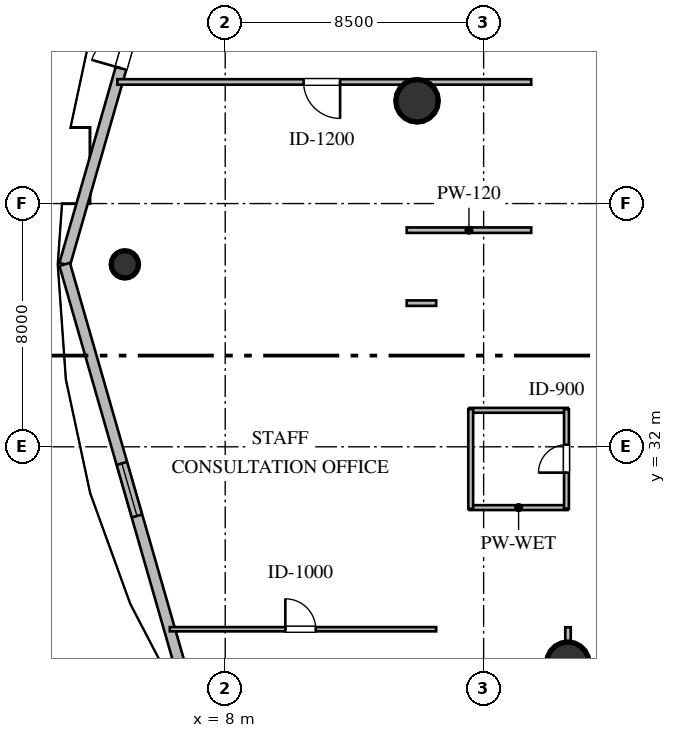
"""IFC4 building model, lengths in metres.
Left out: names, types, materials, properties, quantities, classifications, styles, units other than length and angle.
Written with IfcOpenShell. Run it as: python <this file> out.ifc"""

import sys

from ifc_helpers import new_model, si_unit, direction, frame, frame_2d, origin, origin_2d, place, context, subcontext, project, spatial, rectangle, circle, extrude, element, fill, save


model = new_model("IFC4")
c1 = context("Model", 3, precision=1e-05, world=origin(), true_north=direction((0.0, 1.0)))
c2 = subcontext(c1, "Body", "Model", "MODEL_VIEW")
j1 = project(units=[si_unit("LENGTHUNIT", "METRE"), si_unit("PLANEANGLEUNIT", "RADIAN")], contexts=[c1])
p1 = place(None, origin())
s1 = spatial("IfcSite", under=j1, at=p1, CompositionType="ELEMENT")
p2 = place(p1, origin())
s2 = spatial("IfcBuilding", under=s1, at=p2, CompositionType="ELEMENT")
p3 = place(p2, origin())
s3 = spatial("IfcBuildingStorey", under=s2, at=p3, CompositionType="ELEMENT", Elevation=0.0)
for number, where, z_axis, x_axis in (
    (1, (14.31, 43.38, 0.0), (0.0, 0.0, 1.0), (1.0, 0.0, 0.0)),
    (2, (19.27, 24.88, 0.0), (0.0, 0.0, 1.0), (1.0, 0.0, 0.0)),
):
    element("IfcColumn", number, at=place(p3, frame(where, z_axis=z_axis, x_axis=x_axis)), inside=s3, PredefinedType="COLUMN", context=c2, shape_type="SweptSolid", body=[
        extrude(circle(Radius=0.7, at=origin_2d()), origin(), (0.0, 0.0, 1.0), 4.8),
    ])
p4 = place(p3, frame((4.7, 38.0, 0.0), z_axis=(0.0, 0.0, 1.0), x_axis=(1.0, 0.0, 0.0)))
e3 = element("IfcColumn", 3, at=p4, inside=s3, PredefinedType="COLUMN", context=c2, shape_type="SweptSolid", body=[
    extrude(circle(Radius=0.45, at=origin_2d()), origin(), (0.0, 0.0, 1.0), 4.8),
])
p5 = place(p3, frame((2.72, 38.0, 0.0), z_axis=(0.0, 0.0, 1.0), x_axis=(0.276203409751, 0.961099202186, 0.0)))
e4 = element("IfcWall", 4, at=p5, inside=s3, PredefinedType="STANDARD", context=c2, shape_type="SweptSolid", body=[
    extrude(rectangle(XDim=15.42, YDim=0.36, at=frame_2d((7.71, 0.0))), origin(), (0.0, 0.0, 1.0), 4.52),
])
p6 = place(p5, frame((6.71, 0.0, 0.0)))
e5 = element("IfcOpeningElement", 5, at=p6, cuts=e4, PredefinedType="OPENING", context=c2, shape_type="SweptSolid", body=[
    extrude(rectangle(XDim=2.0, YDim=2.2, at=frame_2d((1.0, 1.1))), frame((0.0, 0.19, 0.0), z_axis=(0.0, -1.0, 0.0), x_axis=(1.0, 0.0, 0.0)), (0.0, 0.0, 1.0), 0.38),
])
p7 = place(p3, frame((2.72, 38.0, 0.0), z_axis=(0.0, 0.0, 1.0), x_axis=(0.276203409751, -0.961099202186, 0.0)))
e6 = element("IfcWall", 6, at=p7, inside=s3, PredefinedType="STANDARD", context=c2, shape_type="SweptSolid", body=[
    extrude(rectangle(XDim=15.42, YDim=0.36, at=frame_2d((7.71, 0.0))), origin(), (0.0, 0.0, 1.0), 4.52),
])
p8 = place(p7, frame((6.81, 0.0, 1.05)))
e7 = element("IfcOpeningElement", 7, at=p8, cuts=e6, PredefinedType="OPENING", context=c2, shape_type="SweptSolid", body=[
    extrude(rectangle(XDim=1.8, YDim=1.7, at=frame_2d((0.9, 0.85))), frame((0.0, 0.19, 0.0), z_axis=(0.0, -1.0, 0.0), x_axis=(1.0, 0.0, 0.0)), (0.0, 0.0, 1.0), 0.38),
])
for number, where, z_axis, x_axis in (
    (8, (16.035, 30.0, 0.0), (0.0, 0.0, 1.0), (1.0, 0.0, 0.0)),
    (9, (16.035, 33.2, 0.0), (0.0, 0.0, 1.0), (1.0, 0.0, 0.0)),
):
    element("IfcWall", number, at=place(p3, frame(where, z_axis=z_axis, x_axis=x_axis)), inside=s3, PredefinedType="PLUMBINGWALL", context=c2, shape_type="SweptSolid", body=[
        extrude(rectangle(XDim=3.23, YDim=0.16, at=frame_2d((1.615, 0.0))), origin(), (0.0, 0.0, 1.0), 4.52),
    ])
p9 = place(p3, frame((16.075, 29.96, 0.0), z_axis=(0.0, 0.0, 1.0), x_axis=(0.0, 1.0, 0.0)))
e10 = element("IfcWall", 10, at=p9, inside=s3, PredefinedType="PLUMBINGWALL", context=c2, shape_type="SweptSolid", body=[
    extrude(rectangle(XDim=3.28, YDim=0.16, at=frame_2d((1.64, 0.0))), origin(), (0.0, 0.0, 1.0), 4.52),
])
p10 = place(p3, frame((19.225, 29.96, 0.0), z_axis=(0.0, 0.0, 1.0), x_axis=(0.0, 1.0, 0.0)))
e11 = element("IfcWall", 11, at=p10, inside=s3, PredefinedType="PLUMBINGWALL", context=c2, shape_type="SweptSolid", body=[
    extrude(rectangle(XDim=3.28, YDim=0.16, at=frame_2d((1.64, 0.0))), origin(), (0.0, 0.0, 1.0), 4.52),
])
p11 = place(p10, frame((1.19, 0.0, 0.0)))
e12 = element("IfcOpeningElement", 12, at=p11, cuts=e11, PredefinedType="OPENING", context=c2, shape_type="SweptSolid", body=[
    extrude(rectangle(XDim=0.92, YDim=2.1, at=frame_2d((0.46, 1.05))), frame((0.0, 0.09, 0.0), z_axis=(0.0, -1.0, 0.0), x_axis=(1.0, 0.0, 0.0)), (0.0, 0.0, 1.0), 0.18),
])
p12 = place(p3, frame((18.065, 44.0, 0.0), z_axis=(0.0, 0.0, 1.0), x_axis=(-1.0, 0.0, 0.0)))
e13 = element("IfcWall", 13, at=p12, inside=s3, PredefinedType="PARTITIONING", context=c2, shape_type="SweptSolid", body=[
    extrude(rectangle(XDim=13.611, YDim=0.18, at=frame_2d((6.805, 0.0))), origin(), (0.0, 0.0, 1.0), 4.52),
])
p13 = place(p12, frame((6.286, 0.0, 0.0)))
e14 = element("IfcOpeningElement", 14, at=p13, cuts=e13, PredefinedType="OPENING", context=c2, shape_type="SweptSolid", body=[
    extrude(rectangle(XDim=1.2, YDim=2.15, at=frame_2d((0.6, 1.075))), frame((0.0, 0.1, 0.0), z_axis=(0.0, -1.0, 0.0), x_axis=(1.0, 0.0, 0.0)), (0.0, 0.0, 1.0), 0.2),
])
p14 = place(p3, frame((13.97, 39.125, 0.0), z_axis=(0.0, 0.0, 1.0), x_axis=(1.0, 0.0, 0.0)))
e15 = element("IfcWall", 15, at=p14, inside=s3, PredefinedType="PARTITIONING", context=c2, shape_type="SweptSolid", body=[
    extrude(rectangle(XDim=4.095, YDim=0.18, at=frame_2d((2.047, 0.0))), origin(), (0.0, 0.0, 1.0), 4.52),
])
p15 = place(p3, frame((19.275, 19.97, 0.0), z_axis=(0.0, 0.0, 1.0), x_axis=(0.0, 1.0, 0.0)))
e16 = element("IfcWall", 16, at=p15, inside=s3, PredefinedType="PARTITIONING", context=c2, shape_type="SweptSolid", body=[
    extrude(rectangle(XDim=6.095, YDim=0.18, at=frame_2d((3.047, 0.0))), origin(), (0.0, 0.0, 1.0), 3.898),
])
p16 = place(p15, frame((1.647, 0.0, 0.0)))
e17 = element("IfcOpeningElement", 17, at=p16, cuts=e16, PredefinedType="OPENING", context=c2, shape_type="SweptSolid", body=[
    extrude(rectangle(XDim=1.2, YDim=2.15, at=frame_2d((0.6, 1.075))), frame((0.0, 0.1, 0.0), z_axis=(0.0, -1.0, 0.0), x_axis=(1.0, 0.0, 0.0)), (0.0, 0.0, 1.0), 0.2),
])
p17 = place(p3, frame((14.94, 36.725, 0.0), z_axis=(0.0, 0.0, 1.0), x_axis=(-1.0, 0.0, 0.0)))
e18 = element("IfcWall", 18, at=p17, inside=s3, PredefinedType="PARTITIONING", context=c2, shape_type="SweptSolid", body=[
    extrude(rectangle(XDim=0.97, YDim=0.18, at=frame_2d((0.485, 0.0))), origin(), (0.0, 0.0, 1.0), 4.52),
])
p18 = place(p3, frame((6.179, 26.0, 0.0), z_axis=(0.0, 0.0, 1.0), x_axis=(1.0, 0.0, 0.0)))
e19 = element("IfcWall", 19, at=p18, inside=s3, PredefinedType="PARTITIONING", context=c2, shape_type="SweptSolid", body=[
    extrude(rectangle(XDim=8.761, YDim=0.14, at=frame_2d((4.381, 0.0))), origin(), (0.0, 0.0, 1.0), 4.52),
])
p19 = place(p18, frame((3.8, 0.0, 0.0)))
e20 = element("IfcOpeningElement", 20, at=p19, cuts=e19, PredefinedType="OPENING", context=c2, shape_type="SweptSolid", body=[
    extrude(rectangle(XDim=1.0, YDim=2.1, at=frame_2d((0.5, 1.05))), frame((0.0, 0.08, 0.0), z_axis=(0.0, -1.0, 0.0), x_axis=(1.0, 0.0, 0.0)), (0.0, 0.0, 1.0), 0.16),
])
p20 = place(p6, origin())
e21 = element("IfcDoor", 21, at=p20, inside=s3, OperationType="DOUBLE_DOOR_SINGLE_SWING", PredefinedType="DOOR", context=c2, shape_type="SweptSolid", body=[
    extrude(rectangle(XDim=2.0, YDim=2.2, at=frame_2d((1.0, 1.1))), frame((0.0, 0.025, 0.0), z_axis=(0.0, -1.0, 0.0), x_axis=(1.0, 0.0, 0.0)), (0.0, 0.0, 1.0), 0.05),
])
fill(e5, e21)
p21 = place(p8, origin())
e22 = element("IfcWindow", 22, at=p21, inside=s3, PartitioningType="SINGLE_PANEL", PredefinedType="WINDOW", context=c2, shape_type="SweptSolid", body=[
    extrude(rectangle(XDim=1.8, YDim=1.7, at=frame_2d((0.9, 0.85))), frame((0.0, 0.03, 0.0), z_axis=(0.0, -1.0, 0.0), x_axis=(1.0, 0.0, 0.0)), (0.0, 0.0, 1.0), 0.06),
])
fill(e7, e22)
p22 = place(p11, origin())
e23 = element("IfcDoor", 23, at=p22, inside=s3, OperationType="SINGLE_SWING_LEFT", PredefinedType="DOOR", context=c2, shape_type="SweptSolid", body=[
    extrude(rectangle(XDim=0.92, YDim=2.1, at=frame_2d((0.46, 1.05))), frame((0.0, 0.025, 0.0), z_axis=(0.0, -1.0, 0.0), x_axis=(1.0, 0.0, 0.0)), (0.0, 0.0, 1.0), 0.05),
])
fill(e12, e23)
p23 = place(p13, origin())
e24 = element("IfcDoor", 24, at=p23, inside=s3, OperationType="SINGLE_SWING_LEFT", PredefinedType="DOOR", context=c2, shape_type="SweptSolid", body=[
    extrude(rectangle(XDim=1.2, YDim=2.15, at=frame_2d((0.6, 1.075))), frame((0.0, 0.025, 0.0), z_axis=(0.0, -1.0, 0.0), x_axis=(1.0, 0.0, 0.0)), (0.0, 0.0, 1.0), 0.05),
])
fill(e14, e24)
p24 = place(p19, origin())
e25 = element("IfcDoor", 25, at=p24, inside=s3, OperationType="SINGLE_SWING_LEFT", PredefinedType="DOOR", context=c2, shape_type="SweptSolid", body=[
    extrude(rectangle(XDim=1.0, YDim=2.1, at=frame_2d((0.5, 1.05))), frame((0.0, 0.025, 0.0), z_axis=(0.0, -1.0, 0.0), x_axis=(1.0, 0.0, 0.0)), (0.0, 0.0, 1.0), 0.05),
])
fill(e20, e25)
save(model, sys.argv[1])
